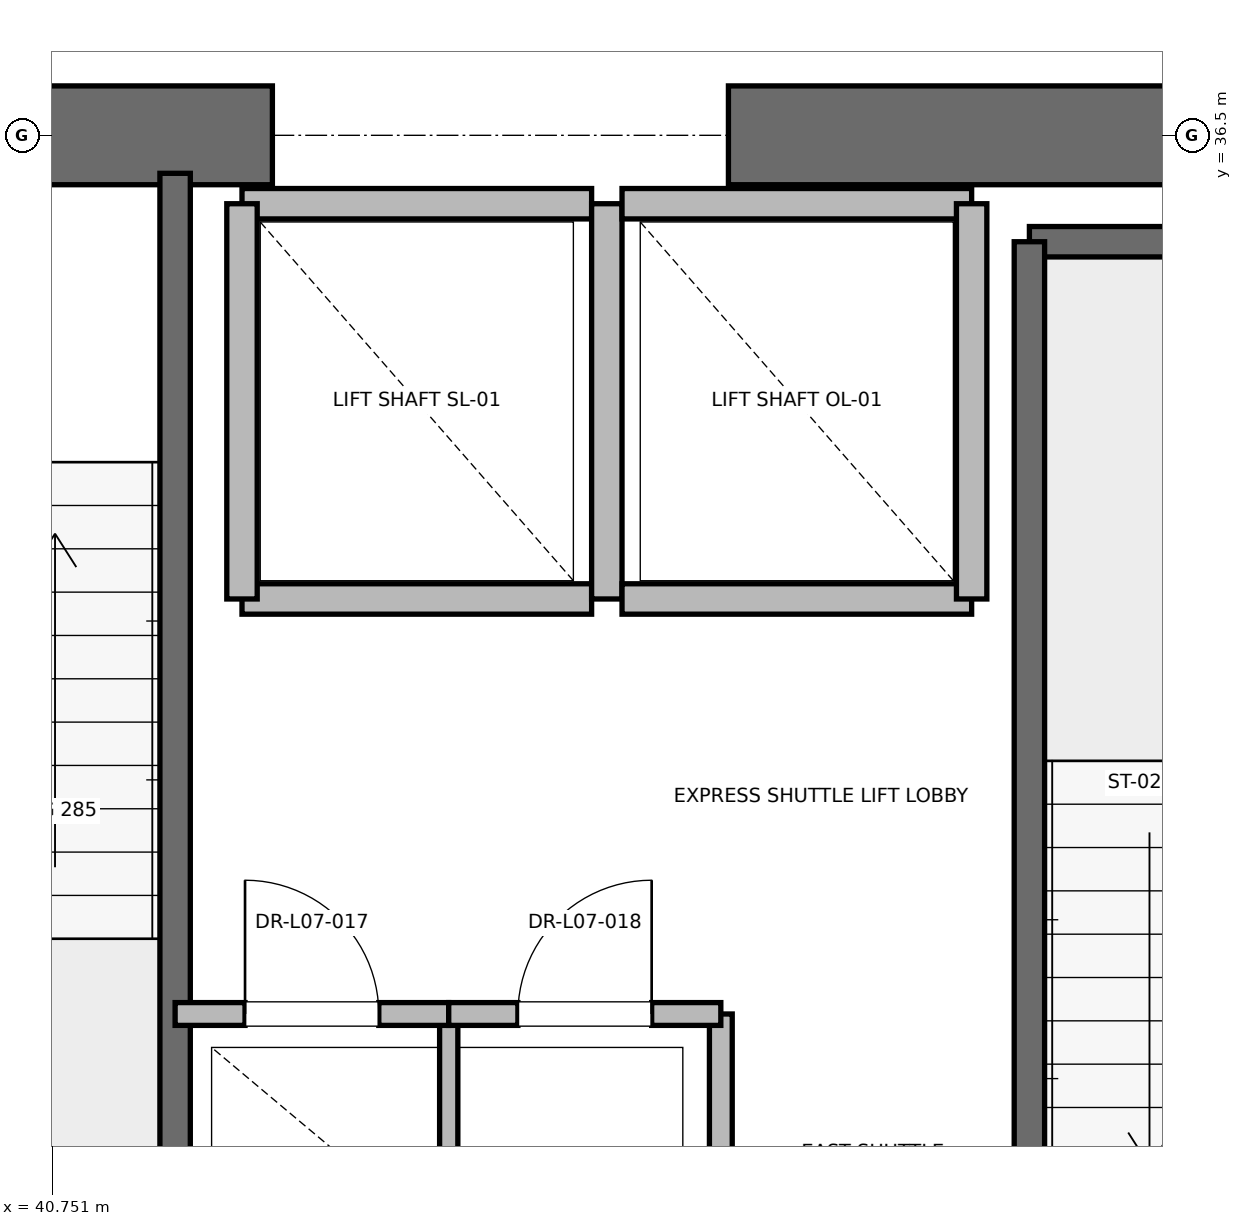
"""IFC4 building model, lengths in metres.
Left out: names, types, materials, properties, quantities, classifications, styles, units other than length and angle.
Written with IfcOpenShell. Run it as: python <this file> out.ifc"""

import sys

from ifc_helpers import new_model, si_unit, direction, frame, frame_2d, origin, place, context, subcontext, project, spatial, rectangle, extrude, element, fill, save


model = new_model("IFC4")
c1 = context("Model", 3, precision=1e-05, world=origin(), true_north=direction((0.0, 1.0)))
c2 = subcontext(c1, "Body", "Model", "MODEL_VIEW")
j1 = project(units=[si_unit("LENGTHUNIT", "METRE"), si_unit("PLANEANGLEUNIT", "RADIAN")], contexts=[c1])
p1 = place(None, origin())
s1 = spatial("IfcSite", under=j1, at=p1, CompositionType="ELEMENT")
p2 = place(p1, origin())
s2 = spatial("IfcBuilding", under=s1, at=p2, CompositionType="ELEMENT")
p3 = place(p2, frame((0.0, 0.0, 35.6)))
s3 = spatial("IfcBuildingStorey", under=s2, at=p3, CompositionType="ELEMENT", Elevation=35.6)
p4 = place(p3, frame((37.8, 36.5, 0.0), z_axis=(0.0, 0.0, 1.0), x_axis=(1.0, 0.0, 0.0)))
e1 = element("IfcWall", 1, at=p4, inside=s3, PredefinedType="SHEAR", context=c2, shape_type="SweptSolid", body=[
    extrude(rectangle(XDim=4.4, YDim=0.65, at=frame_2d((2.2, 0.0))), origin(), (0.0, 0.0, 1.0), 3.76),
])
p5 = place(p4, frame((1.65, 0.0, 0.0)))
e2 = element("IfcOpeningElement", 2, at=p5, cuts=e1, PredefinedType="OPENING", context=c2, shape_type="SweptSolid", body=[
    extrude(rectangle(XDim=1.1, YDim=2.15, at=frame_2d((0.55, 1.075))), frame((0.0, 0.325, 0.0), z_axis=(0.0, -1.0, 0.0), x_axis=(1.0, 0.0, 0.0)), (0.0, 0.0, 1.0), 0.65),
])
p6 = place(p3, frame((45.2, 36.5, 0.0), z_axis=(0.0, 0.0, 1.0), x_axis=(1.0, 0.0, 0.0)))
e3 = element("IfcWall", 3, at=p6, inside=s3, PredefinedType="SHEAR", context=c2, shape_type="SweptSolid", body=[
    extrude(rectangle(XDim=5.8, YDim=0.65, at=frame_2d((2.9, 0.0))), origin(), (0.0, 0.0, 1.0), 3.76),
])
p7 = place(p3, frame((47.18, 35.8, 0.0), z_axis=(0.0, 0.0, 1.0), x_axis=(1.0, 0.0, 0.0)))
e4 = element("IfcWall", 4, at=p7, inside=s3, PredefinedType="SOLIDWALL", context=c2, shape_type="SweptSolid", body=[
    extrude(rectangle(XDim=3.12, YDim=0.2, at=frame_2d((1.56, 0.0))), origin(), (0.0, 0.0, 1.0), 3.76),
])
p8 = place(p3, frame((47.18, 27.62, 0.0), z_axis=(0.0, 0.0, 1.0), x_axis=(0.0, 1.0, 0.0)))
e5 = element("IfcWall", 5, at=p8, inside=s3, PredefinedType="SOLIDWALL", context=c2, shape_type="SweptSolid", body=[
    extrude(rectangle(XDim=8.18, YDim=0.2, at=frame_2d((4.09, 0.0))), origin(), (0.0, 0.0, 1.0), 3.76),
])
p9 = place(p3, frame((41.56, 27.68, 0.0), z_axis=(0.0, 0.0, 1.0), x_axis=(0.0, 1.0, 0.0)))
e6 = element("IfcWall", 6, at=p9, inside=s3, PredefinedType="SOLIDWALL", context=c2, shape_type="SweptSolid", body=[
    extrude(rectangle(XDim=8.57, YDim=0.2, at=frame_2d((4.285, 0.0))), origin(), (0.0, 0.0, 1.0), 3.76),
])
p10 = place(p3, frame((42.0, 33.45, 0.0), z_axis=(0.0, 0.0, 1.0), x_axis=(1.0, 0.0, 0.0)))
e7 = element("IfcWall", 7, at=p10, inside=s3, PredefinedType="SOLIDWALL", context=c2, shape_type="SweptSolid", body=[
    extrude(rectangle(XDim=2.3, YDim=0.2, at=frame_2d((1.15, 0.0))), origin(), (0.0, 0.0, 1.0), 3.76),
])
p11 = place(p3, frame((44.3, 36.05, 0.0), z_axis=(0.0, 0.0, 1.0), x_axis=(-1.0, 0.0, 0.0)))
e8 = element("IfcWall", 8, at=p11, inside=s3, PredefinedType="SOLIDWALL", context=c2, shape_type="SweptSolid", body=[
    extrude(rectangle(XDim=2.3, YDim=0.2, at=frame_2d((1.15, 0.0))), origin(), (0.0, 0.0, 1.0), 2.54),
])
for number, where, z_axis, x_axis in (
    (9, (42.0, 36.05, 0.0), (0.0, 0.0, 1.0), (0.0, -1.0, 0.0)),
    (10, (44.4, 33.45, 0.0), (0.0, 0.0, 1.0), (0.0, 1.0, 0.0)),
):
    element("IfcWall", number, at=place(p3, frame(where, z_axis=z_axis, x_axis=x_axis)), inside=s3, PredefinedType="SOLIDWALL", context=c2, shape_type="SweptSolid", body=[
        extrude(rectangle(XDim=2.6, YDim=0.2, at=frame_2d((1.3, 0.0))), origin(), (0.0, 0.0, 1.0), 2.54),
    ])
p12 = place(p3, frame((44.5, 33.45, 0.0), z_axis=(0.0, 0.0, 1.0), x_axis=(1.0, 0.0, 0.0)))
e11 = element("IfcWall", 11, at=p12, inside=s3, PredefinedType="SOLIDWALL", context=c2, shape_type="SweptSolid", body=[
    extrude(rectangle(XDim=2.3, YDim=0.2, at=frame_2d((1.15, 0.0))), origin(), (0.0, 0.0, 1.0), 3.76),
])
p13 = place(p3, frame((46.8, 36.05, 0.0), z_axis=(0.0, 0.0, 1.0), x_axis=(-1.0, 0.0, 0.0)))
e12 = element("IfcWall", 12, at=p13, inside=s3, PredefinedType="SOLIDWALL", context=c2, shape_type="SweptSolid", body=[
    extrude(rectangle(XDim=2.3, YDim=0.2, at=frame_2d((1.15, 0.0))), origin(), (0.0, 0.0, 1.0), 2.54),
])
p14 = place(p3, frame((46.8, 33.45, 0.0), z_axis=(0.0, 0.0, 1.0), x_axis=(0.0, 1.0, 0.0)))
e13 = element("IfcWall", 13, at=p14, inside=s3, PredefinedType="SOLIDWALL", context=c2, shape_type="SweptSolid", body=[
    extrude(rectangle(XDim=2.6, YDim=0.2, at=frame_2d((1.3, 0.0))), origin(), (0.0, 0.0, 1.0), 3.76),
])
p15 = place(p3, frame((45.15, 27.62, 0.0), z_axis=(0.0, 0.0, 1.0), x_axis=(0.0, 1.0, 0.0)))
e14 = element("IfcWall", 14, at=p15, inside=s3, PredefinedType="PARTITIONING", context=c2, shape_type="SweptSolid", body=[
    extrude(rectangle(XDim=3.1, YDim=0.15, at=frame_2d((1.55, 0.0))), origin(), (0.0, 0.0, 1.0), 2.85),
])
p16 = place(p3, frame((43.36, 27.68, 0.0), z_axis=(0.0, 0.0, 1.0), x_axis=(0.0, 1.0, 0.0)))
e15 = element("IfcWall", 15, at=p16, inside=s3, PredefinedType="PARTITIONING", context=c2, shape_type="SweptSolid", body=[
    extrude(rectangle(XDim=3.04, YDim=0.12, at=frame_2d((1.52, 0.0))), origin(), (0.0, 0.0, 1.0), 2.85),
])
p17 = place(p3, frame((41.56, 30.72, 0.0), z_axis=(0.0, 0.0, 1.0), x_axis=(1.0, 0.0, 0.0)))
e16 = element("IfcWall", 16, at=p17, inside=s3, PredefinedType="PARTITIONING", context=c2, shape_type="SweptSolid", body=[
    extrude(rectangle(XDim=1.8, YDim=0.15, at=frame_2d((0.9, 0.0))), origin(), (0.0, 0.0, 1.0), 2.85),
])
p18 = place(p17, frame((0.46, 0.0, 0.0)))
e17 = element("IfcOpeningElement", 17, at=p18, cuts=e16, PredefinedType="OPENING", context=c2, shape_type="SweptSolid", body=[
    extrude(rectangle(XDim=0.88, YDim=2.1, at=frame_2d((0.44, 1.05))), frame((0.0, 0.075, 0.0), z_axis=(0.0, -1.0, 0.0), x_axis=(1.0, 0.0, 0.0)), (0.0, 0.0, 1.0), 0.15),
])
p19 = place(p3, frame((43.36, 30.72, 0.0), z_axis=(0.0, 0.0, 1.0), x_axis=(1.0, 0.0, 0.0)))
e18 = element("IfcWall", 18, at=p19, inside=s3, PredefinedType="PARTITIONING", context=c2, shape_type="SweptSolid", body=[
    extrude(rectangle(XDim=1.79, YDim=0.15, at=frame_2d((0.895, 0.0))), origin(), (0.0, 0.0, 1.0), 2.85),
])
p20 = place(p19, frame((0.455, 0.0, 0.0)))
e19 = element("IfcOpeningElement", 19, at=p20, cuts=e18, PredefinedType="OPENING", context=c2, shape_type="SweptSolid", body=[
    extrude(rectangle(XDim=0.88, YDim=2.1, at=frame_2d((0.44, 1.05))), frame((0.0, 0.075, 0.0), z_axis=(0.0, -1.0, 0.0), x_axis=(1.0, 0.0, 0.0)), (0.0, 0.0, 1.0), 0.15),
])
p21 = place(p18, origin())
e20 = element("IfcDoor", 20, at=p21, inside=s3, OperationType="SINGLE_SWING_LEFT", PredefinedType="DOOR", context=c2, shape_type="SweptSolid", body=[
    extrude(rectangle(XDim=0.88, YDim=2.1, at=frame_2d((0.44, 1.05))), frame((0.0, 0.025, 0.0), z_axis=(0.0, -1.0, 0.0), x_axis=(1.0, 0.0, 0.0)), (0.0, 0.0, 1.0), 0.05),
])
fill(e17, e20)
p22 = place(p20, origin())
e21 = element("IfcDoor", 21, at=p22, inside=s3, OperationType="SINGLE_SWING_RIGHT", PredefinedType="DOOR", context=c2, shape_type="SweptSolid", body=[
    extrude(rectangle(XDim=0.88, YDim=2.1, at=frame_2d((0.44, 1.05))), frame((0.0, 0.025, 0.0), z_axis=(0.0, -1.0, 0.0), x_axis=(1.0, 0.0, 0.0)), (0.0, 0.0, 1.0), 0.05),
])
fill(e19, e21)
save(model, sys.argv[1])
